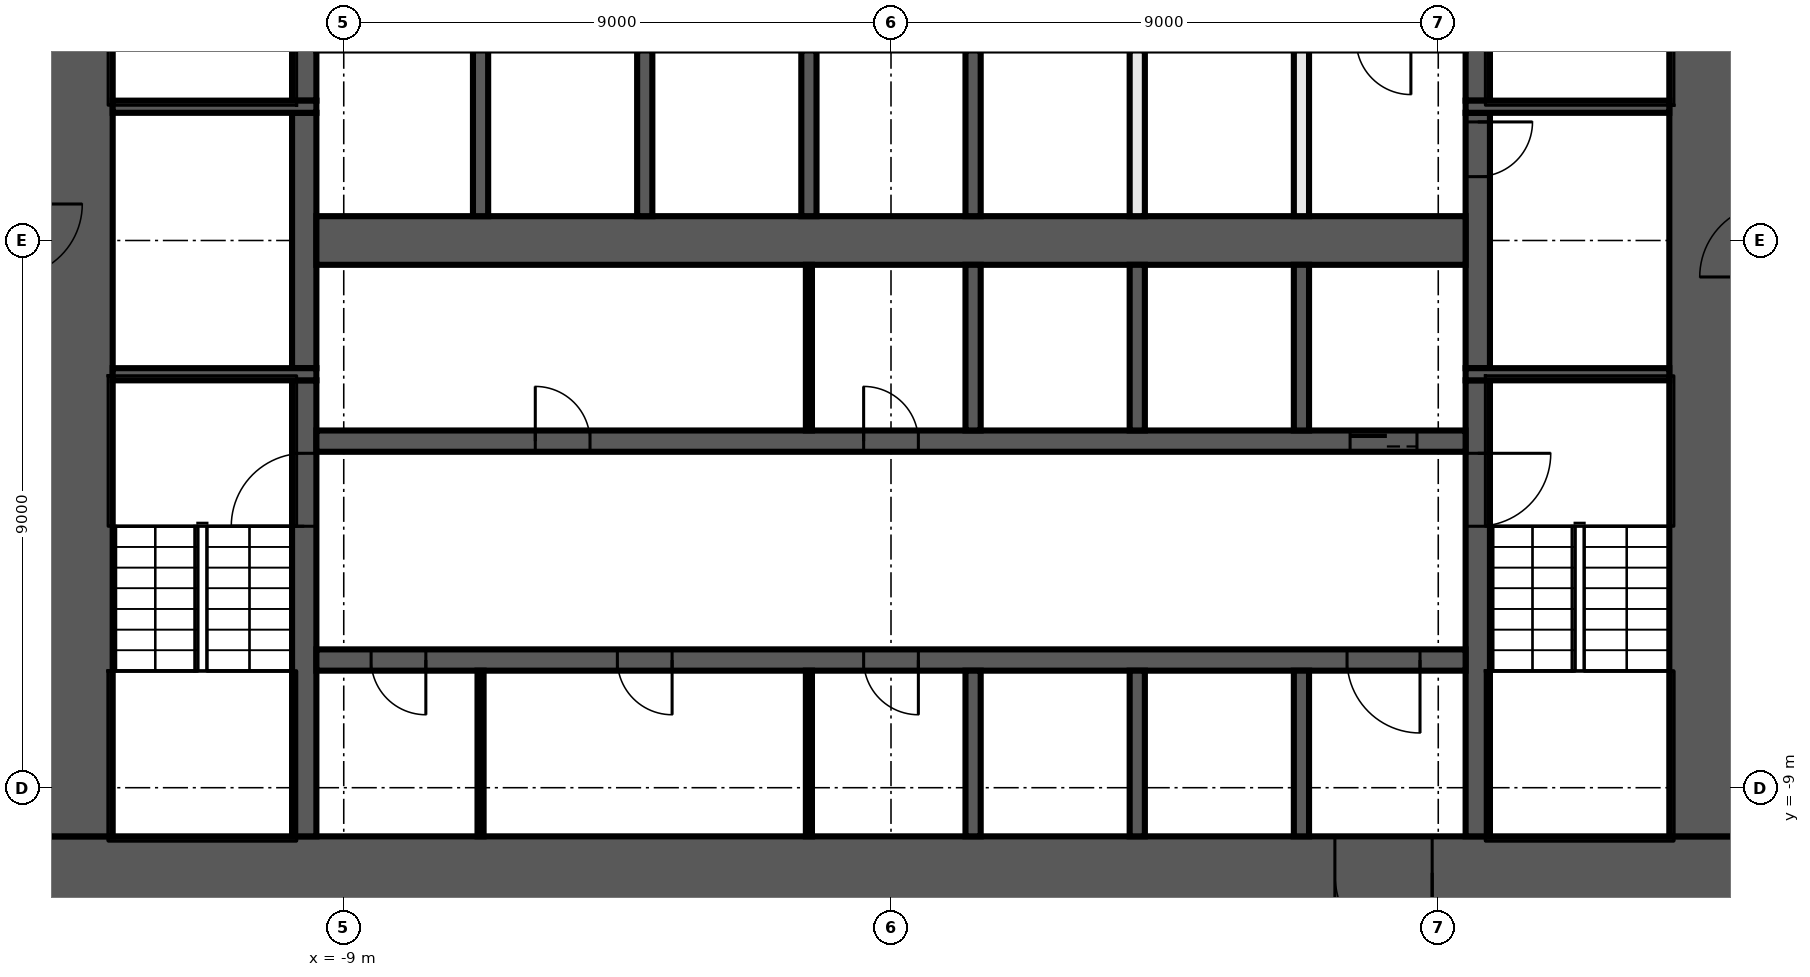
"""IFC4 building model, lengths in metres.
Left out: names, types, materials, properties, quantities, classifications, styles, units other than length and angle.
Written with IfcOpenShell. Run it as: python <this file> out.ifc"""

import sys

from ifc_helpers import new_model, si_unit, direction, frame, frame_2d, origin, place, context, subcontext, project, spatial, rectangle, extrude, element, fill, save


model = new_model("IFC4")
c1 = context("Model", 3, precision=1e-05, world=origin(), true_north=direction((0.0, 1.0)))
c2 = subcontext(c1, "Body", "Model", "MODEL_VIEW")
j1 = project(units=[si_unit("LENGTHUNIT", "METRE"), si_unit("PLANEANGLEUNIT", "RADIAN")], contexts=[c1])
p1 = place(None, origin())
s1 = spatial("IfcSite", under=j1, at=p1, CompositionType="ELEMENT")
p2 = place(p1, origin())
s2 = spatial("IfcBuilding", under=s1, at=p2, CompositionType="ELEMENT")
p3 = place(p2, frame((0.0, 0.0, -17.0)))
s3 = spatial("IfcBuildingStorey", under=s2, at=p3, CompositionType="ELEMENT", Elevation=-17.0)
p4 = place(p3, frame((14.0, -10.4, 0.0), z_axis=(0.0, 0.0, 1.0), x_axis=(-1.0, 0.0, 0.0)))
e1 = element("IfcWall", 1, at=p4, inside=s3, PredefinedType="SHEAR", context=c2, shape_type="SweptSolid", body=[
    extrude(rectangle(XDim=28.0, YDim=1.2, at=frame_2d((14.0, 0.0))), origin(), (0.0, 0.0, 1.0), 5.1),
])
p5 = place(p4, frame((5.1, 0.0, 0.0)))
e2 = element("IfcOpeningElement", 2, at=p5, cuts=e1, PredefinedType="OPENING", context=c2, shape_type="SweptSolid", body=[
    extrude(rectangle(XDim=1.6, YDim=2.1, at=frame_2d((0.8, 1.05))), frame((0.0, 0.61, 0.0), z_axis=(0.0, -1.0, 0.0), x_axis=(1.0, 0.0, 0.0)), (0.0, 0.0, 1.0), 1.22),
])
for number, where, z_axis, x_axis in (
    (3, (13.4, 9.8, 0.0), (0.0, 0.0, 1.0), (0.0, -1.0, 0.0)),
    (4, (-13.4, -9.8, 0.0), (0.0, 0.0, 1.0), (0.0, 1.0, 0.0)),
):
    element("IfcWall", number, at=place(p3, frame(where, z_axis=z_axis, x_axis=x_axis)), inside=s3, PredefinedType="SHEAR", context=c2, shape_type="SweptSolid", body=[
        extrude(rectangle(XDim=19.6, YDim=1.2, at=frame_2d((9.8, 0.0))), origin(), (0.0, 0.0, 1.0), 5.1),
    ])
p6 = place(p3, frame((9.65, -2.3, 0.0), z_axis=(0.0, 0.0, 1.0), x_axis=(0.0, -1.0, 0.0)))
e5 = element("IfcWall", 5, at=p6, inside=s3, PredefinedType="SHEAR", context=c2, shape_type="SweptSolid", body=[
    extrude(rectangle(XDim=7.5, YDim=0.4, at=frame_2d((3.75, 0.0))), origin(), (0.0, 0.0, 1.0), 5.1),
])
p7 = place(p6, frame((1.2, 0.0, 0.0)))
e6 = element("IfcOpeningElement", 6, at=p7, cuts=e5, PredefinedType="OPENING", context=c2, shape_type="SweptSolid", body=[
    extrude(rectangle(XDim=1.2, YDim=2.1, at=frame_2d((0.6, 1.05))), frame((0.0, 0.21, 0.0), z_axis=(0.0, -1.0, 0.0), x_axis=(1.0, 0.0, 0.0)), (0.0, 0.0, 1.0), 0.42),
])
p8 = place(p3, frame((9.65, 2.1, 0.0), z_axis=(0.0, 0.0, 1.0), x_axis=(0.0, -1.0, 0.0)))
e7 = element("IfcWall", 7, at=p8, inside=s3, PredefinedType="SHEAR", context=c2, shape_type="SweptSolid", body=[
    extrude(rectangle(XDim=4.2, YDim=0.4, at=frame_2d((2.1, 0.0))), origin(), (0.0, 0.0, 1.0), 5.1),
])
p9 = place(p8, frame((0.15, 0.0, 0.0)))
e8 = element("IfcOpeningElement", 8, at=p9, cuts=e7, PredefinedType="OPENING", context=c2, shape_type="SweptSolid", body=[
    extrude(rectangle(XDim=0.9, YDim=2.1, at=frame_2d((0.45, 1.05))), frame((0.0, 0.21, 0.0), z_axis=(0.0, -1.0, 0.0), x_axis=(1.0, 0.0, 0.0)), (0.0, 0.0, 1.0), 0.42),
])
p10 = place(p3, frame((9.65, 9.8, 0.0), z_axis=(0.0, 0.0, 1.0), x_axis=(0.0, -1.0, 0.0)))
e9 = element("IfcWall", 9, at=p10, inside=s3, PredefinedType="SHEAR", context=c2, shape_type="SweptSolid", body=[
    extrude(rectangle(XDim=7.5, YDim=0.4, at=frame_2d((3.75, 0.0))), origin(), (0.0, 0.0, 1.0), 5.1),
])
p11 = place(p10, frame((5.1, 0.0, 0.0)))
e10 = element("IfcOpeningElement", 10, at=p11, cuts=e9, PredefinedType="OPENING", context=c2, shape_type="SweptSolid", body=[
    extrude(rectangle(XDim=1.2, YDim=2.1, at=frame_2d((0.6, 1.05))), frame((0.0, 0.21, 0.0), z_axis=(0.0, -1.0, 0.0), x_axis=(1.0, 0.0, 0.0)), (0.0, 0.0, 1.0), 0.42),
])
p12 = place(p3, frame((-9.65, -9.8, 0.0), z_axis=(0.0, 0.0, 1.0), x_axis=(0.0, 1.0, 0.0)))
e11 = element("IfcWall", 11, at=p12, inside=s3, PredefinedType="SHEAR", context=c2, shape_type="SweptSolid", body=[
    extrude(rectangle(XDim=7.5, YDim=0.4, at=frame_2d((3.75, 0.0))), origin(), (0.0, 0.0, 1.0), 5.1),
])
p13 = place(p12, frame((5.1, 0.0, 0.0)))
e12 = element("IfcOpeningElement", 12, at=p13, cuts=e11, PredefinedType="OPENING", context=c2, shape_type="SweptSolid", body=[
    extrude(rectangle(XDim=1.2, YDim=2.1, at=frame_2d((0.6, 1.05))), frame((0.0, 0.21, 0.0), z_axis=(0.0, -1.0, 0.0), x_axis=(1.0, 0.0, 0.0)), (0.0, 0.0, 1.0), 0.42),
])
p14 = place(p3, frame((-9.65, -2.1, 0.0), z_axis=(0.0, 0.0, 1.0), x_axis=(0.0, 1.0, 0.0)))
e13 = element("IfcWall", 13, at=p14, inside=s3, PredefinedType="SHEAR", context=c2, shape_type="SweptSolid", body=[
    extrude(rectangle(XDim=4.2, YDim=0.4, at=frame_2d((2.1, 0.0))), origin(), (0.0, 0.0, 1.0), 5.1),
])
p15 = place(p3, frame((-9.65, 2.3, 0.0), z_axis=(0.0, 0.0, 1.0), x_axis=(0.0, 1.0, 0.0)))
e14 = element("IfcWall", 14, at=p15, inside=s3, PredefinedType="SHEAR", context=c2, shape_type="SweptSolid", body=[
    extrude(rectangle(XDim=7.5, YDim=0.4, at=frame_2d((3.75, 0.0))), origin(), (0.0, 0.0, 1.0), 5.1),
])
p16 = place(p15, frame((1.2, 0.0, 0.0)))
e15 = element("IfcOpeningElement", 15, at=p16, cuts=e14, PredefinedType="OPENING", context=c2, shape_type="SweptSolid", body=[
    extrude(rectangle(XDim=1.2, YDim=2.1, at=frame_2d((0.6, 1.05))), frame((0.0, 0.21, 0.0), z_axis=(0.0, -1.0, 0.0), x_axis=(1.0, 0.0, 0.0)), (0.0, 0.0, 1.0), 0.42),
])
for number, where, z_axis, x_axis in (
    (16, (9.45, 2.2, 0.0), (0.0, 0.0, 1.0), (1.0, 0.0, 0.0)),
    (17, (-9.45, 2.2, 0.0), (0.0, 0.0, 1.0), (-1.0, 0.0, 0.0)),
    (18, (9.45, -2.2, 0.0), (0.0, 0.0, 1.0), (1.0, 0.0, 0.0)),
    (19, (-9.45, -2.2, 0.0), (0.0, 0.0, 1.0), (-1.0, 0.0, 0.0)),
):
    element("IfcWall", number, at=place(p3, frame(where, z_axis=z_axis, x_axis=x_axis)), inside=s3, PredefinedType="SHEAR", context=c2, shape_type="SweptSolid", body=[
        extrude(rectangle(XDim=3.35, YDim=0.2, at=frame_2d((1.675, 0.0))), origin(), (0.0, 0.0, 1.0), 5.1),
    ])
p17 = place(p3, frame((-9.45, -3.3, 0.0), z_axis=(0.0, 0.0, 1.0), x_axis=(1.0, 0.0, 0.0)))
e20 = element("IfcWall", 20, at=p17, inside=s3, PredefinedType="SHEAR", context=c2, shape_type="SweptSolid", body=[
    extrude(rectangle(XDim=18.9, YDim=0.35, at=frame_2d((9.45, 0.0))), origin(), (0.0, 0.0, 1.0), 5.1),
])
p18 = place(p17, frame((17.0, 0.0, 0.0)))
e21 = element("IfcOpeningElement", 21, at=p18, cuts=e20, PredefinedType="OPENING", context=c2, shape_type="SweptSolid", body=[
    extrude(rectangle(XDim=1.1, YDim=2.1, at=frame_2d((0.55, 1.05))), frame((0.0, 0.185, 0.0), z_axis=(0.0, -1.0, 0.0), x_axis=(1.0, 0.0, 0.0)), (0.0, 0.0, 1.0), 0.37),
])
p19 = place(p17, frame((3.6, 0.0, 0.0)))
e22 = element("IfcOpeningElement", 22, at=p19, cuts=e20, PredefinedType="OPENING", context=c2, shape_type="SweptSolid", body=[
    extrude(rectangle(XDim=0.9, YDim=2.1, at=frame_2d((0.45, 1.05))), frame((0.0, 0.185, 0.0), z_axis=(0.0, -1.0, 0.0), x_axis=(1.0, 0.0, 0.0)), (0.0, 0.0, 1.0), 0.37),
])
p20 = place(p17, frame((9.0, 0.0, 0.0)))
e23 = element("IfcOpeningElement", 23, at=p20, cuts=e20, PredefinedType="OPENING", context=c2, shape_type="SweptSolid", body=[
    extrude(rectangle(XDim=0.9, YDim=2.1, at=frame_2d((0.45, 1.05))), frame((0.0, 0.185, 0.0), z_axis=(0.0, -1.0, 0.0), x_axis=(1.0, 0.0, 0.0)), (0.0, 0.0, 1.0), 0.37),
])
p21 = place(p3, frame((9.45, -6.9, 0.0), z_axis=(0.0, 0.0, 1.0), x_axis=(-1.0, 0.0, 0.0)))
e24 = element("IfcWall", 24, at=p21, inside=s3, PredefinedType="SHEAR", context=c2, shape_type="SweptSolid", body=[
    extrude(rectangle(XDim=18.9, YDim=0.35, at=frame_2d((9.45, 0.0))), origin(), (0.0, 0.0, 1.0), 5.1),
])
p22 = place(p21, frame((0.75, 0.0, 0.0)))
e25 = element("IfcOpeningElement", 25, at=p22, cuts=e24, PredefinedType="OPENING", context=c2, shape_type="SweptSolid", body=[
    extrude(rectangle(XDim=1.2, YDim=2.1, at=frame_2d((0.6, 1.05))), frame((0.0, 0.185, 0.0), z_axis=(0.0, -1.0, 0.0), x_axis=(1.0, 0.0, 0.0)), (0.0, 0.0, 1.0), 0.37),
])
p23 = place(p21, frame((17.1, 0.0, 0.0)))
e26 = element("IfcOpeningElement", 26, at=p23, cuts=e24, PredefinedType="OPENING", context=c2, shape_type="SweptSolid", body=[
    extrude(rectangle(XDim=0.9, YDim=2.1, at=frame_2d((0.45, 1.05))), frame((0.0, 0.185, 0.0), z_axis=(0.0, -1.0, 0.0), x_axis=(1.0, 0.0, 0.0)), (0.0, 0.0, 1.0), 0.37),
])
p24 = place(p21, frame((13.05, 0.0, 0.0)))
e27 = element("IfcOpeningElement", 27, at=p24, cuts=e24, PredefinedType="OPENING", context=c2, shape_type="SweptSolid", body=[
    extrude(rectangle(XDim=0.9, YDim=2.1, at=frame_2d((0.45, 1.05))), frame((0.0, 0.185, 0.0), z_axis=(0.0, -1.0, 0.0), x_axis=(1.0, 0.0, 0.0)), (0.0, 0.0, 1.0), 0.37),
])
p25 = place(p21, frame((9.0, 0.0, 0.0)))
e28 = element("IfcOpeningElement", 28, at=p25, cuts=e24, PredefinedType="OPENING", context=c2, shape_type="SweptSolid", body=[
    extrude(rectangle(XDim=0.9, YDim=2.1, at=frame_2d((0.45, 1.05))), frame((0.0, 0.185, 0.0), z_axis=(0.0, -1.0, 0.0), x_axis=(1.0, 0.0, 0.0)), (0.0, 0.0, 1.0), 0.37),
])
p26 = place(p3, frame((-9.45, 0.0, 0.0), z_axis=(0.0, 0.0, 1.0), x_axis=(1.0, 0.0, 0.0)))
e29 = element("IfcWall", 29, at=p26, inside=s3, PredefinedType="SHEAR", context=c2, shape_type="SweptSolid", body=[
    extrude(rectangle(XDim=18.9, YDim=0.8, at=frame_2d((9.45, 0.0))), origin(), (0.0, 0.0, 1.0), 5.1),
])
for number, where, z_axis, x_axis in (
    (30, (6.75, -9.8, 0.0), (0.0, 0.0, 1.0), (0.0, 1.0, 0.0)),
    (31, (6.75, -3.125, 0.0), (0.0, 0.0, 1.0), (0.0, 1.0, 0.0)),
):
    element("IfcWall", number, at=place(p3, frame(where, z_axis=z_axis, x_axis=x_axis)), inside=s3, PredefinedType="SHEAR", context=c2, shape_type="SweptSolid", body=[
        extrude(rectangle(XDim=2.725, YDim=0.25, at=frame_2d((1.363, 0.0))), origin(), (0.0, 0.0, 1.0), 5.1),
    ])
p27 = place(p3, frame((6.75, 0.4, 0.0), z_axis=(0.0, 0.0, 1.0), x_axis=(0.0, 1.0, 0.0)))
e32 = element("IfcWall", 32, at=p27, inside=s3, PredefinedType="SOLIDWALL", context=c2, shape_type="SweptSolid", body=[
    extrude(rectangle(XDim=2.725, YDim=0.25, at=frame_2d((1.363, 0.0))), origin(), (0.0, 0.0, 1.0), 5.1),
])
for number, where, z_axis, x_axis in (
    (33, (4.05, -9.8, 0.0), (0.0, 0.0, 1.0), (0.0, 1.0, 0.0)),
    (34, (4.05, -3.125, 0.0), (0.0, 0.0, 1.0), (0.0, 1.0, 0.0)),
):
    element("IfcWall", number, at=place(p3, frame(where, z_axis=z_axis, x_axis=x_axis)), inside=s3, PredefinedType="SHEAR", context=c2, shape_type="SweptSolid", body=[
        extrude(rectangle(XDim=2.725, YDim=0.25, at=frame_2d((1.363, 0.0))), origin(), (0.0, 0.0, 1.0), 5.1),
    ])
p28 = place(p3, frame((4.05, 0.4, 0.0), z_axis=(0.0, 0.0, 1.0), x_axis=(0.0, 1.0, 0.0)))
e35 = element("IfcWall", 35, at=p28, inside=s3, PredefinedType="SOLIDWALL", context=c2, shape_type="SweptSolid", body=[
    extrude(rectangle(XDim=2.725, YDim=0.25, at=frame_2d((1.363, 0.0))), origin(), (0.0, 0.0, 1.0), 5.1),
])
for number, where, z_axis, x_axis in (
    (36, (1.35, -9.8, 0.0), (0.0, 0.0, 1.0), (0.0, 1.0, 0.0)),
    (37, (1.35, -3.125, 0.0), (0.0, 0.0, 1.0), (0.0, 1.0, 0.0)),
    (38, (1.35, 0.4, 0.0), (0.0, 0.0, 1.0), (0.0, 1.0, 0.0)),
):
    element("IfcWall", number, at=place(p3, frame(where, z_axis=z_axis, x_axis=x_axis)), inside=s3, PredefinedType="SHEAR", context=c2, shape_type="SweptSolid", body=[
        extrude(rectangle(XDim=2.725, YDim=0.25, at=frame_2d((1.363, 0.0))), origin(), (0.0, 0.0, 1.0), 5.1),
    ])
for number, where, z_axis, x_axis in (
    (39, (-1.35, -9.8, 0.0), (0.0, 0.0, 1.0), (0.0, 1.0, 0.0)),
    (40, (-1.35, -3.125, 0.0), (0.0, 0.0, 1.0), (0.0, 1.0, 0.0)),
):
    element("IfcWall", number, at=place(p3, frame(where, z_axis=z_axis, x_axis=x_axis)), inside=s3, PredefinedType="PARTITIONING", context=c2, shape_type="SweptSolid", body=[
        extrude(rectangle(XDim=2.725, YDim=0.1, at=frame_2d((1.363, 0.0))), origin(), (0.0, 0.0, 1.0), 5.1),
    ])
for number, where, z_axis, x_axis in (
    (41, (-1.35, 0.4, 0.0), (0.0, 0.0, 1.0), (0.0, 1.0, 0.0)),
    (42, (-4.05, 0.4, 0.0), (0.0, 0.0, 1.0), (0.0, 1.0, 0.0)),
):
    element("IfcWall", number, at=place(p3, frame(where, z_axis=z_axis, x_axis=x_axis)), inside=s3, PredefinedType="SHEAR", context=c2, shape_type="SweptSolid", body=[
        extrude(rectangle(XDim=2.725, YDim=0.25, at=frame_2d((1.363, 0.0))), origin(), (0.0, 0.0, 1.0), 5.1),
    ])
p29 = place(p3, frame((-6.75, -9.8, 0.0), z_axis=(0.0, 0.0, 1.0), x_axis=(0.0, 1.0, 0.0)))
e43 = element("IfcWall", 43, at=p29, inside=s3, PredefinedType="PARTITIONING", context=c2, shape_type="SweptSolid", body=[
    extrude(rectangle(XDim=2.725, YDim=0.1, at=frame_2d((1.363, 0.0))), origin(), (0.0, 0.0, 1.0), 5.1),
])
p30 = place(p3, frame((-6.75, 0.4, 0.0), z_axis=(0.0, 0.0, 1.0), x_axis=(0.0, 1.0, 0.0)))
e44 = element("IfcWall", 44, at=p30, inside=s3, PredefinedType="SHEAR", context=c2, shape_type="SweptSolid", body=[
    extrude(rectangle(XDim=2.725, YDim=0.25, at=frame_2d((1.363, 0.0))), origin(), (0.0, 0.0, 1.0), 5.1),
])
p31 = place(p9, origin())
e45 = element("IfcDoor", 45, at=p31, inside=s3, OperationType="SINGLE_SWING_RIGHT", PredefinedType="DOOR", context=c2, shape_type="SweptSolid", body=[
    extrude(rectangle(XDim=0.9, YDim=2.1, at=frame_2d((0.45, 1.05))), frame((0.0, 0.025, 0.0), z_axis=(0.0, -1.0, 0.0), x_axis=(1.0, 0.0, 0.0)), (0.0, 0.0, 1.0), 0.05),
])
fill(e8, e45)
p32 = place(p18, origin())
e46 = element("IfcDoor", 46, at=p32, inside=s3, OperationType="DOUBLE_DOOR_SLIDING", PredefinedType="DOOR", context=c2, shape_type="SweptSolid", body=[
    extrude(rectangle(XDim=1.1, YDim=2.1, at=frame_2d((0.55, 1.05))), frame((0.0, 0.025, 0.0), z_axis=(0.0, -1.0, 0.0), x_axis=(1.0, 0.0, 0.0)), (0.0, 0.0, 1.0), 0.05),
])
fill(e21, e46)
p33 = place(p5, origin())
e47 = element("IfcDoor", 47, at=p33, inside=s3, OperationType="DOUBLE_DOOR_SINGLE_SWING", PredefinedType="DOOR", context=c2, shape_type="SweptSolid", body=[
    extrude(rectangle(XDim=1.6, YDim=2.1, at=frame_2d((0.8, 1.05))), frame((0.0, 0.025, 0.0), z_axis=(0.0, -1.0, 0.0), x_axis=(1.0, 0.0, 0.0)), (0.0, 0.0, 1.0), 0.05),
])
fill(e2, e47)
p34 = place(p22, origin())
e48 = element("IfcDoor", 48, at=p34, inside=s3, OperationType="SINGLE_SWING_LEFT", PredefinedType="DOOR", context=c2, shape_type="SweptSolid", body=[
    extrude(rectangle(XDim=1.2, YDim=2.1, at=frame_2d((0.6, 1.05))), frame((0.0, 0.025, 0.0), z_axis=(0.0, -1.0, 0.0), x_axis=(1.0, 0.0, 0.0)), (0.0, 0.0, 1.0), 0.05),
])
fill(e25, e48)
p35 = place(p19, origin())
e49 = element("IfcDoor", 49, at=p35, inside=s3, OperationType="SINGLE_SWING_RIGHT", PredefinedType="DOOR", context=c2, shape_type="SweptSolid", body=[
    extrude(rectangle(XDim=0.9, YDim=2.1, at=frame_2d((0.45, 1.05))), frame((0.0, 0.025, 0.0), z_axis=(0.0, -1.0, 0.0), x_axis=(1.0, 0.0, 0.0)), (0.0, 0.0, 1.0), 0.05),
])
fill(e22, e49)
p36 = place(p20, origin())
e50 = element("IfcDoor", 50, at=p36, inside=s3, OperationType="SINGLE_SWING_LEFT", PredefinedType="DOOR", context=c2, shape_type="SweptSolid", body=[
    extrude(rectangle(XDim=0.9, YDim=2.1, at=frame_2d((0.45, 1.05))), frame((0.0, 0.025, 0.0), z_axis=(0.0, -1.0, 0.0), x_axis=(1.0, 0.0, 0.0)), (0.0, 0.0, 1.0), 0.05),
])
fill(e23, e50)
p37 = place(p23, origin())
e51 = element("IfcDoor", 51, at=p37, inside=s3, OperationType="SINGLE_SWING_RIGHT", PredefinedType="DOOR", context=c2, shape_type="SweptSolid", body=[
    extrude(rectangle(XDim=0.9, YDim=2.1, at=frame_2d((0.45, 1.05))), frame((0.0, 0.025, 0.0), z_axis=(0.0, -1.0, 0.0), x_axis=(1.0, 0.0, 0.0)), (0.0, 0.0, 1.0), 0.05),
])
fill(e26, e51)
p38 = place(p24, origin())
e52 = element("IfcDoor", 52, at=p38, inside=s3, OperationType="SINGLE_SWING_LEFT", PredefinedType="DOOR", context=c2, shape_type="SweptSolid", body=[
    extrude(rectangle(XDim=0.9, YDim=2.1, at=frame_2d((0.45, 1.05))), frame((0.0, 0.025, 0.0), z_axis=(0.0, -1.0, 0.0), x_axis=(1.0, 0.0, 0.0)), (0.0, 0.0, 1.0), 0.05),
])
fill(e27, e52)
p39 = place(p25, origin())
e53 = element("IfcDoor", 53, at=p39, inside=s3, OperationType="SINGLE_SWING_RIGHT", PredefinedType="DOOR", context=c2, shape_type="SweptSolid", body=[
    extrude(rectangle(XDim=0.9, YDim=2.1, at=frame_2d((0.45, 1.05))), frame((0.0, 0.025, 0.0), z_axis=(0.0, -1.0, 0.0), x_axis=(1.0, 0.0, 0.0)), (0.0, 0.0, 1.0), 0.05),
])
fill(e28, e53)
p40 = place(p7, origin())
e54 = element("IfcDoor", 54, at=p40, inside=s3, OperationType="SINGLE_SWING_RIGHT", PredefinedType="DOOR", context=c2, shape_type="SweptSolid", body=[
    extrude(rectangle(XDim=1.2, YDim=2.1, at=frame_2d((0.6, 1.05))), frame((0.0, 0.025, 0.0), z_axis=(0.0, -1.0, 0.0), x_axis=(1.0, 0.0, 0.0)), (0.0, 0.0, 1.0), 0.05),
])
fill(e6, e54)
p41 = place(p13, origin())
e55 = element("IfcDoor", 55, at=p41, inside=s3, OperationType="SINGLE_SWING_LEFT", PredefinedType="DOOR", context=c2, shape_type="SweptSolid", body=[
    extrude(rectangle(XDim=1.2, YDim=2.1, at=frame_2d((0.6, 1.05))), frame((0.0, 0.025, 0.0), z_axis=(0.0, -1.0, 0.0), x_axis=(1.0, 0.0, 0.0)), (0.0, 0.0, 1.0), 0.05),
])
fill(e12, e55)
save(model, sys.argv[1])
